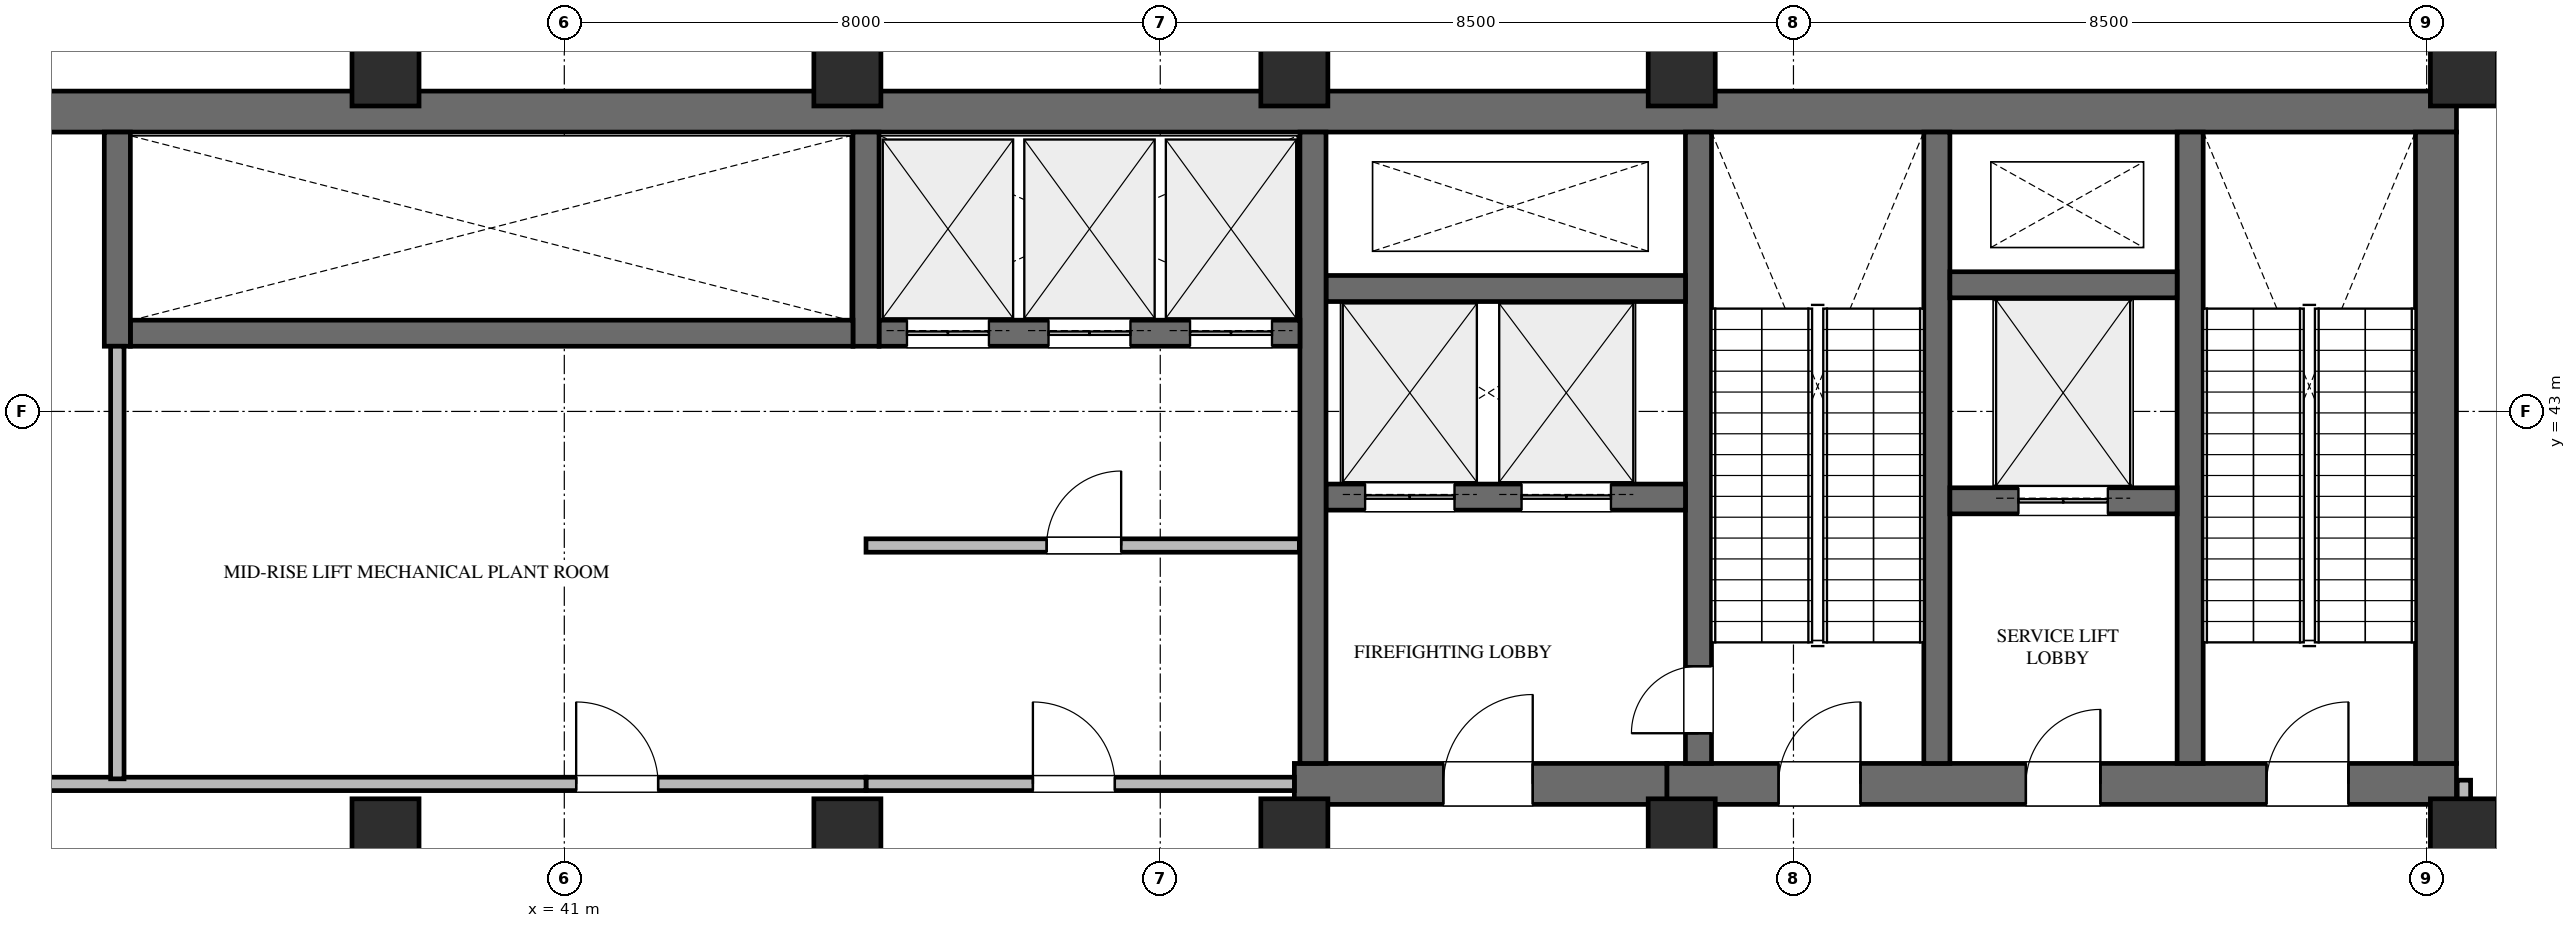
"""IFC4 building model, lengths in metres.
Left out: names, types, materials, properties, quantities, classifications, styles, units other than length and angle.
Written with IfcOpenShell. Run it as: python <this file> out.ifc"""

import sys

from ifc_helpers import new_model, si_unit, direction, frame, frame_2d, origin, origin_2d, place, context, subcontext, project, spatial, rectangle, extrude, element, fill, save


model = new_model("IFC4")
c1 = context("Model", 3, precision=1e-05, world=origin(), true_north=direction((0.0, 1.0)))
c2 = subcontext(c1, "Body", "Model", "MODEL_VIEW")
j1 = project(units=[si_unit("LENGTHUNIT", "METRE"), si_unit("PLANEANGLEUNIT", "RADIAN")], contexts=[c1])
p1 = place(None, origin())
s1 = spatial("IfcSite", under=j1, at=p1, CompositionType="ELEMENT")
p2 = place(p1, origin())
s2 = spatial("IfcBuilding", under=s1, at=p2, CompositionType="ELEMENT")
p3 = place(p2, frame((0.0, 0.0, 225.0)))
s3 = spatial("IfcBuildingStorey", under=s2, at=p3, CompositionType="ELEMENT", Elevation=225.0)
p4 = place(p3, frame((22.9, 47.025, 0.0), z_axis=(0.0, 0.0, 1.0), x_axis=(1.0, 0.0, 0.0)))
e1 = element("IfcWall", 1, at=p4, inside=s3, PredefinedType="SHEAR", context=c2, shape_type="SweptSolid", body=[
    extrude(rectangle(XDim=43.5, YDim=0.55, at=frame_2d((21.75, 0.0))), origin(), (0.0, 0.0, 1.0), 6.0),
])
p5 = place(p3, frame((55.8, 38.0, 0.0), z_axis=(0.0, 0.0, 1.0), x_axis=(1.0, 0.0, 0.0)))
e2 = element("IfcWall", 2, at=p5, inside=s3, PredefinedType="SHEAR", context=c2, shape_type="SweptSolid", body=[
    extrude(rectangle(XDim=10.6, YDim=0.55, at=frame_2d((5.3, 0.0))), origin(), (0.0, 0.0, 1.0), 6.0),
])
p6 = place(p5, frame((1.5, 0.0, 0.0)))
e3 = element("IfcOpeningElement", 3, at=p6, cuts=e2, PredefinedType="OPENING", context=c2, shape_type="SweptSolid", body=[
    extrude(rectangle(XDim=1.1, YDim=2.2, at=frame_2d((0.55, 1.1))), frame((0.0, 0.285, 0.0), z_axis=(0.0, -1.0, 0.0), x_axis=(1.0, 0.0, 0.0)), (0.0, 0.0, 1.0), 0.57),
])
p7 = place(p5, frame((4.82, 0.0, 0.0)))
e4 = element("IfcOpeningElement", 4, at=p7, cuts=e2, PredefinedType="OPENING", context=c2, shape_type="SweptSolid", body=[
    extrude(rectangle(XDim=1.0, YDim=2.15, at=frame_2d((0.5, 1.075))), frame((0.0, 0.285, 0.0), z_axis=(0.0, -1.0, 0.0), x_axis=(1.0, 0.0, 0.0)), (0.0, 0.0, 1.0), 0.57),
])
p8 = place(p5, frame((8.05, 0.0, 0.0)))
e5 = element("IfcOpeningElement", 5, at=p8, cuts=e2, PredefinedType="OPENING", context=c2, shape_type="SweptSolid", body=[
    extrude(rectangle(XDim=1.1, YDim=2.2, at=frame_2d((0.55, 1.1))), frame((0.0, 0.285, 0.0), z_axis=(0.0, -1.0, 0.0), x_axis=(1.0, 0.0, 0.0)), (0.0, 0.0, 1.0), 0.57),
])
p9 = place(p3, frame((66.125, 38.275, 0.0), z_axis=(0.0, 0.0, 1.0), x_axis=(0.0, 1.0, 0.0)))
e6 = element("IfcWall", 6, at=p9, inside=s3, PredefinedType="SHEAR", context=c2, shape_type="SweptSolid", body=[
    extrude(rectangle(XDim=8.475, YDim=0.55, at=frame_2d((4.238, 0.0))), origin(), (0.0, 0.0, 1.0), 6.0),
])
for number, where, z_axis, x_axis in (
    (7, (62.825, 38.275, 0.0), (0.0, 0.0, 1.0), (0.0, 1.0, 0.0)),
    (8, (59.425, 38.275, 0.0), (0.0, 0.0, 1.0), (0.0, 1.0, 0.0)),
):
    element("IfcWall", number, at=place(p3, frame(where, z_axis=z_axis, x_axis=x_axis)), inside=s3, PredefinedType="SHEAR", context=c2, shape_type="SweptSolid", body=[
        extrude(rectangle(XDim=8.475, YDim=0.35, at=frame_2d((4.238, 0.0))), origin(), (0.0, 0.0, 1.0), 6.0),
    ])
p10 = place(p3, frame((56.225, 38.275, 0.0), z_axis=(0.0, 0.0, 1.0), x_axis=(0.0, 1.0, 0.0)))
e9 = element("IfcWall", 9, at=p10, inside=s3, PredefinedType="SHEAR", context=c2, shape_type="SweptSolid", body=[
    extrude(rectangle(XDim=8.475, YDim=0.35, at=frame_2d((4.238, 0.0))), origin(), (0.0, 0.0, 1.0), 6.0),
])
p11 = place(p10, frame((0.405, 0.0, 0.0)))
e10 = element("IfcOpeningElement", 10, at=p11, cuts=e9, PredefinedType="OPENING", context=c2, shape_type="SweptSolid", body=[
    extrude(rectangle(XDim=0.9, YDim=2.15, at=frame_2d((0.45, 1.075))), frame((0.0, 0.185, 0.0), z_axis=(0.0, -1.0, 0.0), x_axis=(1.0, 0.0, 0.0)), (0.0, 0.0, 1.0), 0.37),
])
p12 = place(p3, frame((59.6, 41.8, 0.0), z_axis=(0.0, 0.0, 1.0), x_axis=(1.0, 0.0, 0.0)))
e11 = element("IfcWall", 11, at=p12, inside=s3, PredefinedType="SHEAR", context=c2, shape_type="SweptSolid", body=[
    extrude(rectangle(XDim=3.05, YDim=0.35, at=frame_2d((1.525, 0.0))), origin(), (0.0, 0.0, 1.0), 6.0),
])
p13 = place(p12, frame((0.92, 0.0, 0.0)))
e12 = element("IfcOpeningElement", 12, at=p13, cuts=e11, PredefinedType="OPENING", context=c2, shape_type="SweptSolid", body=[
    extrude(rectangle(XDim=1.2, YDim=2.2, at=frame_2d((0.6, 1.1))), frame((0.0, 0.185, 0.0), z_axis=(0.0, -1.0, 0.0), x_axis=(1.0, 0.0, 0.0)), (0.0, 0.0, 1.0), 0.37),
])
p14 = place(p3, frame((59.6, 44.7, 0.0), z_axis=(0.0, 0.0, 1.0), x_axis=(1.0, 0.0, 0.0)))
e13 = element("IfcWall", 13, at=p14, inside=s3, PredefinedType="SHEAR", context=c2, shape_type="SweptSolid", body=[
    extrude(rectangle(XDim=3.05, YDim=0.35, at=frame_2d((1.525, 0.0))), origin(), (0.0, 0.0, 1.0), 6.0),
])
p15 = place(p3, frame((50.8, 38.0, 0.0), z_axis=(0.0, 0.0, 1.0), x_axis=(1.0, 0.0, 0.0)))
e14 = element("IfcWall", 14, at=p15, inside=s3, PredefinedType="SHEAR", context=c2, shape_type="SweptSolid", body=[
    extrude(rectangle(XDim=5.0, YDim=0.55, at=frame_2d((2.5, 0.0))), origin(), (0.0, 0.0, 1.0), 6.0),
])
p16 = place(p15, frame((2.0, 0.0, 0.0)))
e15 = element("IfcOpeningElement", 15, at=p16, cuts=e14, PredefinedType="OPENING", context=c2, shape_type="SweptSolid", body=[
    extrude(rectangle(XDim=1.2, YDim=2.2, at=frame_2d((0.6, 1.1))), frame((0.0, 0.285, 0.0), z_axis=(0.0, -1.0, 0.0), x_axis=(1.0, 0.0, 0.0)), (0.0, 0.0, 1.0), 0.57),
])
p17 = place(p3, frame((51.225, 41.85, 0.0), z_axis=(0.0, 0.0, 1.0), x_axis=(1.0, 0.0, 0.0)))
e16 = element("IfcWall", 16, at=p17, inside=s3, PredefinedType="SHEAR", context=c2, shape_type="SweptSolid", body=[
    extrude(rectangle(XDim=4.825, YDim=0.35, at=frame_2d((2.413, 0.0))), origin(), (0.0, 0.0, 1.0), 6.0),
])
p18 = place(p17, frame((0.525, 0.0, 0.0)))
e17 = element("IfcOpeningElement", 17, at=p18, cuts=e16, PredefinedType="OPENING", context=c2, shape_type="SweptSolid", body=[
    extrude(rectangle(XDim=1.2, YDim=2.2, at=frame_2d((0.6, 1.1))), frame((0.0, 0.185, 0.0), z_axis=(0.0, -1.0, 0.0), x_axis=(1.0, 0.0, 0.0)), (0.0, 0.0, 1.0), 0.37),
])
p19 = place(p17, frame((2.625, 0.0, 0.0)))
e18 = element("IfcOpeningElement", 18, at=p19, cuts=e16, PredefinedType="OPENING", context=c2, shape_type="SweptSolid", body=[
    extrude(rectangle(XDim=1.2, YDim=2.2, at=frame_2d((0.6, 1.1))), frame((0.0, 0.185, 0.0), z_axis=(0.0, -1.0, 0.0), x_axis=(1.0, 0.0, 0.0)), (0.0, 0.0, 1.0), 0.37),
])
p20 = place(p3, frame((51.225, 44.65, 0.0), z_axis=(0.0, 0.0, 1.0), x_axis=(1.0, 0.0, 0.0)))
e19 = element("IfcWall", 19, at=p20, inside=s3, PredefinedType="SHEAR", context=c2, shape_type="SweptSolid", body=[
    extrude(rectangle(XDim=4.825, YDim=0.35, at=frame_2d((2.413, 0.0))), origin(), (0.0, 0.0, 1.0), 6.0),
])
p21 = place(p3, frame((51.05, 38.275, 0.0), z_axis=(0.0, 0.0, 1.0), x_axis=(0.0, 1.0, 0.0)))
e20 = element("IfcWall", 20, at=p21, inside=s3, PredefinedType="SHEAR", context=c2, shape_type="SweptSolid", body=[
    extrude(rectangle(XDim=8.475, YDim=0.35, at=frame_2d((4.238, 0.0))), origin(), (0.0, 0.0, 1.0), 6.0),
])
p22 = place(p3, frame((45.225, 44.05, 0.0), z_axis=(0.0, 0.0, 1.0), x_axis=(1.0, 0.0, 0.0)))
e21 = element("IfcWall", 21, at=p22, inside=s3, PredefinedType="SHEAR", context=c2, shape_type="SweptSolid", body=[
    extrude(rectangle(XDim=5.65, YDim=0.35, at=frame_2d((2.825, 0.0))), origin(), (0.0, 0.0, 1.0), 6.0),
])
p23 = place(p22, frame((0.375, 0.0, 0.0)))
e22 = element("IfcOpeningElement", 22, at=p23, cuts=e21, PredefinedType="OPENING", context=c2, shape_type="SweptSolid", body=[
    extrude(rectangle(XDim=1.1, YDim=2.2, at=frame_2d((0.55, 1.1))), frame((0.0, 0.185, 0.0), z_axis=(0.0, -1.0, 0.0), x_axis=(1.0, 0.0, 0.0)), (0.0, 0.0, 1.0), 0.37),
])
p24 = place(p22, frame((2.275, 0.0, 0.0)))
e23 = element("IfcOpeningElement", 23, at=p24, cuts=e21, PredefinedType="OPENING", context=c2, shape_type="SweptSolid", body=[
    extrude(rectangle(XDim=1.1, YDim=2.2, at=frame_2d((0.55, 1.1))), frame((0.0, 0.185, 0.0), z_axis=(0.0, -1.0, 0.0), x_axis=(1.0, 0.0, 0.0)), (0.0, 0.0, 1.0), 0.37),
])
p25 = place(p22, frame((4.175, 0.0, 0.0)))
e24 = element("IfcOpeningElement", 24, at=p25, cuts=e21, PredefinedType="OPENING", context=c2, shape_type="SweptSolid", body=[
    extrude(rectangle(XDim=1.1, YDim=2.2, at=frame_2d((0.55, 1.1))), frame((0.0, 0.185, 0.0), z_axis=(0.0, -1.0, 0.0), x_axis=(1.0, 0.0, 0.0)), (0.0, 0.0, 1.0), 0.37),
])
p26 = place(p3, frame((45.05, 43.875, 0.0), z_axis=(0.0, 0.0, 1.0), x_axis=(0.0, 1.0, 0.0)))
e25 = element("IfcWall", 25, at=p26, inside=s3, PredefinedType="SHEAR", context=c2, shape_type="SweptSolid", body=[
    extrude(rectangle(XDim=2.875, YDim=0.35, at=frame_2d((1.438, 0.0))), origin(), (0.0, 0.0, 1.0), 6.0),
])
p27 = place(p3, frame((35.175, 44.05, 0.0), z_axis=(0.0, 0.0, 1.0), x_axis=(1.0, 0.0, 0.0)))
e26 = element("IfcWall", 26, at=p27, inside=s3, PredefinedType="SHEAR", context=c2, shape_type="SweptSolid", body=[
    extrude(rectangle(XDim=9.7, YDim=0.35, at=frame_2d((4.85, 0.0))), origin(), (0.0, 0.0, 1.0), 6.0),
])
p28 = place(p3, frame((35.0, 43.875, 0.0), z_axis=(0.0, 0.0, 1.0), x_axis=(0.0, 1.0, 0.0)))
e27 = element("IfcWall", 27, at=p28, inside=s3, PredefinedType="SHEAR", context=c2, shape_type="SweptSolid", body=[
    extrude(rectangle(XDim=2.875, YDim=0.35, at=frame_2d((1.438, 0.0))), origin(), (0.0, 0.0, 1.0), 6.0),
])
for number, where, z_axis, x_axis in (
    (28, (66.5, 47.55, 0.0), (0.0, 0.0, 1.0), (1.0, 0.0, 0.0)),
    (29, (56.0, 47.55, 0.0), (0.0, 0.0, 1.0), (1.0, 0.0, 0.0)),
    (30, (66.5, 37.35, 0.0), (0.0, 0.0, 1.0), (1.0, 0.0, 0.0)),
    (31, (56.0, 37.35, 0.0), (0.0, 0.0, 1.0), (1.0, 0.0, 0.0)),
    (32, (50.8, 47.55, 0.0), (0.0, 0.0, 1.0), (1.0, 0.0, 0.0)),
    (33, (50.8, 37.35, 0.0), (0.0, 0.0, 1.0), (1.0, 0.0, 0.0)),
    (34, (44.8, 37.35, 0.0), (0.0, 0.0, 1.0), (1.0, 0.0, 0.0)),
    (35, (44.8, 47.55, 0.0), (0.0, 0.0, 1.0), (1.0, 0.0, 0.0)),
    (36, (38.6, 37.35, 0.0), (0.0, 0.0, 1.0), (1.0, 0.0, 0.0)),
    (37, (38.6, 47.55, 0.0), (0.0, 0.0, 1.0), (1.0, 0.0, 0.0)),
):
    element("IfcColumn", number, at=place(p3, frame(where, z_axis=z_axis, x_axis=x_axis)), inside=s3, PredefinedType="COLUMN", context=c2, shape_type="SweptSolid", body=[
        extrude(rectangle(XDim=0.9, YDim=0.9, at=origin_2d()), origin(), (0.0, 0.0, 1.0), 6.0),
    ])
p29 = place(p3, frame((45.05, 38.0, 0.0), z_axis=(0.0, 0.0, 1.0), x_axis=(1.0, 0.0, 0.0)))
e38 = element("IfcWall", 38, at=p29, inside=s3, PredefinedType="STANDARD", context=c2, shape_type="SweptSolid", body=[
    extrude(rectangle(XDim=5.75, YDim=0.18, at=frame_2d((2.875, 0.0))), origin(), (0.0, 0.0, 1.0), 4.977),
])
p30 = place(p29, frame((2.24, 0.0, 0.0)))
e39 = element("IfcOpeningElement", 39, at=p30, cuts=e38, PredefinedType="OPENING", context=c2, shape_type="SweptSolid", body=[
    extrude(rectangle(XDim=1.1, YDim=2.2, at=frame_2d((0.55, 1.1))), frame((0.0, 0.1, 0.0), z_axis=(0.0, -1.0, 0.0), x_axis=(1.0, 0.0, 0.0)), (0.0, 0.0, 1.0), 0.2),
])
p31 = place(p3, frame((45.05, 41.2, 0.0), z_axis=(0.0, 0.0, 1.0), x_axis=(1.0, 0.0, 0.0)))
e40 = element("IfcWall", 40, at=p31, inside=s3, PredefinedType="STANDARD", context=c2, shape_type="SweptSolid", body=[
    extrude(rectangle(XDim=5.817, YDim=0.18, at=frame_2d((2.908, 0.0))), origin(), (0.0, 0.0, 1.0), 4.977),
])
p32 = place(p31, frame((2.425, 0.0, 0.0)))
e41 = element("IfcOpeningElement", 41, at=p32, cuts=e40, PredefinedType="OPENING", context=c2, shape_type="SweptSolid", body=[
    extrude(rectangle(XDim=1.0, YDim=2.15, at=frame_2d((0.5, 1.075))), frame((0.0, 0.1, 0.0), z_axis=(0.0, -1.0, 0.0), x_axis=(1.0, 0.0, 0.0)), (0.0, 0.0, 1.0), 0.2),
])
p33 = place(p3, frame((27.05, 38.0, 0.0), z_axis=(0.0, 0.0, 1.0), x_axis=(1.0, 0.0, 0.0)))
e42 = element("IfcWall", 42, at=p33, inside=s3, PredefinedType="STANDARD", context=c2, shape_type="SweptSolid", body=[
    extrude(rectangle(XDim=18.0, YDim=0.18, at=frame_2d((9.0, 0.0))), origin(), (0.0, 0.0, 1.0), 4.977),
])
p34 = place(p33, frame((2.492, 0.0, 0.0)))
e43 = element("IfcOpeningElement", 43, at=p34, cuts=e42, PredefinedType="OPENING", context=c2, shape_type="SweptSolid", body=[
    extrude(rectangle(XDim=1.1, YDim=2.2, at=frame_2d((0.55, 1.1))), frame((0.0, 0.1, 0.0), z_axis=(0.0, -1.0, 0.0), x_axis=(1.0, 0.0, 0.0)), (0.0, 0.0, 1.0), 0.2),
])
p35 = place(p33, frame((14.109, 0.0, 0.0)))
e44 = element("IfcOpeningElement", 44, at=p35, cuts=e42, PredefinedType="OPENING", context=c2, shape_type="SweptSolid", body=[
    extrude(rectangle(XDim=1.1, YDim=2.2, at=frame_2d((0.55, 1.1))), frame((0.0, 0.1, 0.0), z_axis=(0.0, -1.0, 0.0), x_axis=(1.0, 0.0, 0.0)), (0.0, 0.0, 1.0), 0.2),
])
p36 = place(p3, frame((35.0, 38.068, 0.0), z_axis=(0.0, 0.0, 1.0), x_axis=(0.0, 1.0, 0.0)))
e45 = element("IfcWall", 45, at=p36, inside=s3, PredefinedType="STANDARD", context=c2, shape_type="SweptSolid", body=[
    extrude(rectangle(XDim=5.807, YDim=0.18, at=frame_2d((2.903, 0.0))), origin(), (0.0, 0.0, 1.0), 5.75),
])
p37 = place(p3, frame((66.5, 34.468, 0.0), z_axis=(0.0, 0.0, 1.0), x_axis=(0.0, 1.0, 0.0)))
e46 = element("IfcWall", 46, at=p37, inside=s3, PredefinedType="STANDARD", context=c2, shape_type="SweptSolid", body=[
    extrude(rectangle(XDim=3.582, YDim=0.18, at=frame_2d((1.791, 0.0))), origin(), (0.0, 0.0, 1.0), 4.977),
])
p38 = place(p6, origin())
e47 = element("IfcDoor", 47, at=p38, inside=s3, OperationType="SINGLE_SWING_RIGHT", PredefinedType="DOOR", context=c2, shape_type="SweptSolid", body=[
    extrude(rectangle(XDim=1.1, YDim=2.2, at=frame_2d((0.55, 1.1))), frame((0.0, 0.025, 0.0), z_axis=(0.0, -1.0, 0.0), x_axis=(1.0, 0.0, 0.0)), (0.0, 0.0, 1.0), 0.05),
])
fill(e3, e47)
p39 = place(p7, origin())
e48 = element("IfcDoor", 48, at=p39, inside=s3, OperationType="SINGLE_SWING_RIGHT", PredefinedType="DOOR", context=c2, shape_type="SweptSolid", body=[
    extrude(rectangle(XDim=1.0, YDim=2.15, at=frame_2d((0.5, 1.075))), frame((0.0, 0.025, 0.0), z_axis=(0.0, -1.0, 0.0), x_axis=(1.0, 0.0, 0.0)), (0.0, 0.0, 1.0), 0.05),
])
fill(e4, e48)
p40 = place(p8, origin())
e49 = element("IfcDoor", 49, at=p40, inside=s3, OperationType="SINGLE_SWING_RIGHT", PredefinedType="DOOR", context=c2, shape_type="SweptSolid", body=[
    extrude(rectangle(XDim=1.1, YDim=2.2, at=frame_2d((0.55, 1.1))), frame((0.0, 0.025, 0.0), z_axis=(0.0, -1.0, 0.0), x_axis=(1.0, 0.0, 0.0)), (0.0, 0.0, 1.0), 0.05),
])
fill(e5, e49)
p41 = place(p16, origin())
e50 = element("IfcDoor", 50, at=p41, inside=s3, OperationType="SINGLE_SWING_RIGHT", PredefinedType="DOOR", context=c2, shape_type="SweptSolid", body=[
    extrude(rectangle(XDim=1.2, YDim=2.2, at=frame_2d((0.6, 1.1))), frame((0.0, 0.025, 0.0), z_axis=(0.0, -1.0, 0.0), x_axis=(1.0, 0.0, 0.0)), (0.0, 0.0, 1.0), 0.05),
])
fill(e15, e50)
p42 = place(p11, origin())
e51 = element("IfcDoor", 51, at=p42, inside=s3, OperationType="SINGLE_SWING_LEFT", PredefinedType="DOOR", context=c2, shape_type="SweptSolid", body=[
    extrude(rectangle(XDim=0.9, YDim=2.15, at=frame_2d((0.45, 1.075))), frame((0.0, 0.025, 0.0), z_axis=(0.0, -1.0, 0.0), x_axis=(1.0, 0.0, 0.0)), (0.0, 0.0, 1.0), 0.05),
])
fill(e10, e51)
p43 = place(p23, origin())
e52 = element("IfcDoor", 52, at=p43, inside=s3, OperationType="DOUBLE_DOOR_SLIDING", PredefinedType="DOOR", context=c2, shape_type="SweptSolid", body=[
    extrude(rectangle(XDim=1.1, YDim=2.2, at=frame_2d((0.55, 1.1))), frame((0.0, 0.025, 0.0), z_axis=(0.0, -1.0, 0.0), x_axis=(1.0, 0.0, 0.0)), (0.0, 0.0, 1.0), 0.05),
])
fill(e22, e52)
p44 = place(p24, origin())
e53 = element("IfcDoor", 53, at=p44, inside=s3, OperationType="DOUBLE_DOOR_SLIDING", PredefinedType="DOOR", context=c2, shape_type="SweptSolid", body=[
    extrude(rectangle(XDim=1.1, YDim=2.2, at=frame_2d((0.55, 1.1))), frame((0.0, 0.025, 0.0), z_axis=(0.0, -1.0, 0.0), x_axis=(1.0, 0.0, 0.0)), (0.0, 0.0, 1.0), 0.05),
])
fill(e23, e53)
p45 = place(p25, origin())
e54 = element("IfcDoor", 54, at=p45, inside=s3, OperationType="DOUBLE_DOOR_SLIDING", PredefinedType="DOOR", context=c2, shape_type="SweptSolid", body=[
    extrude(rectangle(XDim=1.1, YDim=2.2, at=frame_2d((0.55, 1.1))), frame((0.0, 0.025, 0.0), z_axis=(0.0, -1.0, 0.0), x_axis=(1.0, 0.0, 0.0)), (0.0, 0.0, 1.0), 0.05),
])
fill(e24, e54)
p46 = place(p18, origin())
e55 = element("IfcDoor", 55, at=p46, inside=s3, OperationType="DOUBLE_DOOR_SLIDING", PredefinedType="DOOR", context=c2, shape_type="SweptSolid", body=[
    extrude(rectangle(XDim=1.2, YDim=2.2, at=frame_2d((0.6, 1.1))), frame((0.0, 0.025, 0.0), z_axis=(0.0, -1.0, 0.0), x_axis=(1.0, 0.0, 0.0)), (0.0, 0.0, 1.0), 0.05),
])
fill(e17, e55)
p47 = place(p19, origin())
e56 = element("IfcDoor", 56, at=p47, inside=s3, OperationType="DOUBLE_DOOR_SLIDING", PredefinedType="DOOR", context=c2, shape_type="SweptSolid", body=[
    extrude(rectangle(XDim=1.2, YDim=2.2, at=frame_2d((0.6, 1.1))), frame((0.0, 0.025, 0.0), z_axis=(0.0, -1.0, 0.0), x_axis=(1.0, 0.0, 0.0)), (0.0, 0.0, 1.0), 0.05),
])
fill(e18, e56)
p48 = place(p13, origin())
e57 = element("IfcDoor", 57, at=p48, inside=s3, OperationType="DOUBLE_DOOR_SLIDING", PredefinedType="DOOR", context=c2, shape_type="SweptSolid", body=[
    extrude(rectangle(XDim=1.2, YDim=2.2, at=frame_2d((0.6, 1.1))), frame((0.0, 0.025, 0.0), z_axis=(0.0, -1.0, 0.0), x_axis=(1.0, 0.0, 0.0)), (0.0, 0.0, 1.0), 0.05),
])
fill(e12, e57)
p49 = place(p32, origin())
e58 = element("IfcDoor", 58, at=p49, inside=s3, OperationType="SINGLE_SWING_RIGHT", PredefinedType="DOOR", context=c2, shape_type="SweptSolid", body=[
    extrude(rectangle(XDim=1.0, YDim=2.15, at=frame_2d((0.5, 1.075))), frame((0.0, 0.025, 0.0), z_axis=(0.0, -1.0, 0.0), x_axis=(1.0, 0.0, 0.0)), (0.0, 0.0, 1.0), 0.05),
])
fill(e41, e58)
p50 = place(p30, origin())
e59 = element("IfcDoor", 59, at=p50, inside=s3, OperationType="SINGLE_SWING_LEFT", PredefinedType="DOOR", context=c2, shape_type="SweptSolid", body=[
    extrude(rectangle(XDim=1.1, YDim=2.2, at=frame_2d((0.55, 1.1))), frame((0.0, 0.025, 0.0), z_axis=(0.0, -1.0, 0.0), x_axis=(1.0, 0.0, 0.0)), (0.0, 0.0, 1.0), 0.05),
])
fill(e39, e59)
p51 = place(p35, origin())
e60 = element("IfcDoor", 60, at=p51, inside=s3, OperationType="SINGLE_SWING_LEFT", PredefinedType="DOOR", context=c2, shape_type="SweptSolid", body=[
    extrude(rectangle(XDim=1.1, YDim=2.2, at=frame_2d((0.55, 1.1))), frame((0.0, 0.025, 0.0), z_axis=(0.0, -1.0, 0.0), x_axis=(1.0, 0.0, 0.0)), (0.0, 0.0, 1.0), 0.05),
])
fill(e44, e60)
save(model, sys.argv[1])
